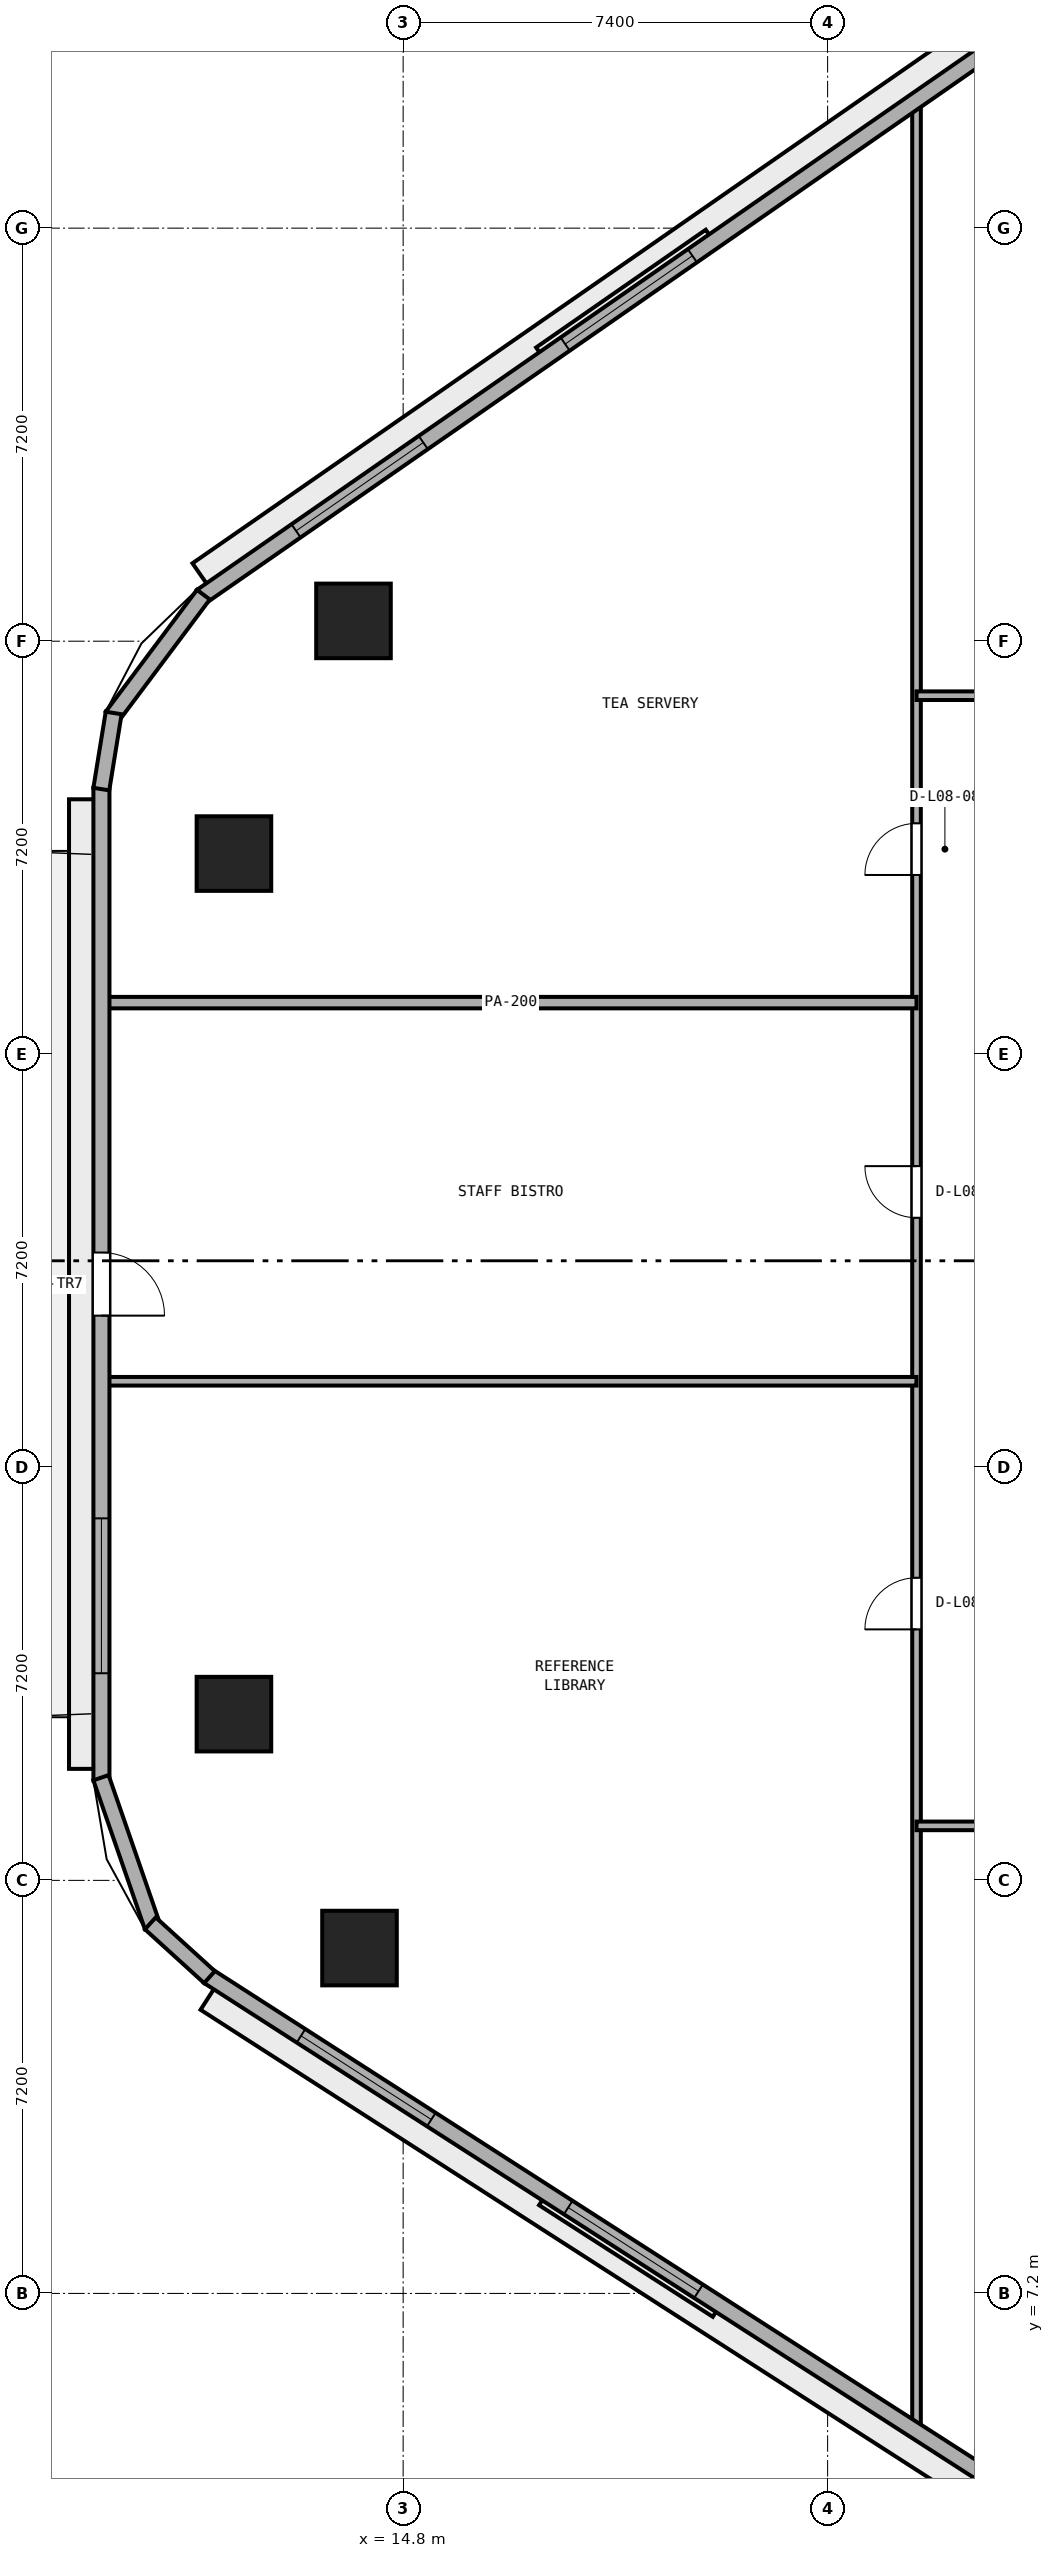
"""IFC4 building model, lengths in metres.
Left out: names, types, materials, properties, quantities, classifications, styles, units other than length and angle.
Written with IfcOpenShell. Run it as: python <this file> out.ifc"""

import sys

from ifc_helpers import new_model, si_unit, direction, frame, frame_2d, origin, origin_2d, place, context, subcontext, project, spatial, rectangle, extrude, element, fill, save


model = new_model("IFC4")
c1 = context("Model", 3, precision=1e-05, world=origin(), true_north=direction((0.0, 1.0)))
c2 = subcontext(c1, "Body", "Model", "MODEL_VIEW")
j1 = project(units=[si_unit("LENGTHUNIT", "METRE"), si_unit("PLANEANGLEUNIT", "RADIAN")], contexts=[c1])
p1 = place(None, origin())
s1 = spatial("IfcSite", under=j1, at=p1, CompositionType="ELEMENT")
p2 = place(p1, origin())
s2 = spatial("IfcBuilding", under=s1, at=p2, CompositionType="ELEMENT")
p3 = place(p2, frame((0.0, 0.0, 36.4)))
s3 = spatial("IfcBuildingStorey", under=s2, at=p3, CompositionType="ELEMENT", Elevation=36.4)
for number, where, z_axis, x_axis in (
    (1, (13.934, 36.354, 0.0), (0.0, 0.0, 1.0), (1.0, 0.0, 0.0)),
    (2, (11.85, 32.298, 0.0), (0.0, 0.0, 1.0), (1.0, 0.0, 0.0)),
    (3, (11.85, 17.298, 0.0), (0.0, 0.0, 1.0), (1.0, 0.0, 0.0)),
    (4, (14.039, 13.22, 0.0), (0.0, 0.0, 1.0), (1.0, 0.0, 0.0)),
):
    element("IfcColumn", number, at=place(p3, frame(where, z_axis=z_axis, x_axis=x_axis)), inside=s3, PredefinedType="COLUMN", context=c2, shape_type="SweptSolid", body=[
        extrude(rectangle(XDim=1.3, YDim=1.3, at=origin_2d()), origin(), (0.0, 0.0, 1.0), 3.8),
    ])
p4 = place(p3, frame((23.75, 4.769, 0.0), z_axis=(0.0, 0.0, 1.0), x_axis=(0.0, 1.0, 0.0)))
e5 = element("IfcWall", 5, at=p4, inside=s3, PredefinedType="PARTITIONING", context=c2, shape_type="SweptSolid", body=[
    extrude(rectangle(XDim=40.691, YDim=0.15, at=frame_2d((20.345, 0.0))), origin(), (0.0, 0.0, 1.0), 3.525),
])
p5 = place(p4, frame((14.006, 0.0, 0.0)))
e6 = element("IfcOpeningElement", 6, at=p5, cuts=e5, PredefinedType="OPENING", context=c2, shape_type="SweptSolid", body=[
    extrude(rectangle(XDim=0.9, YDim=2.1, at=frame_2d((0.45, 1.05))), frame((0.0, 0.085, 0.0), z_axis=(0.0, -1.0, 0.0), x_axis=(1.0, 0.0, 0.0)), (0.0, 0.0, 1.0), 0.17),
])
p6 = place(p4, frame((21.181, 0.0, 0.0)))
e7 = element("IfcOpeningElement", 7, at=p6, cuts=e5, PredefinedType="OPENING", context=c2, shape_type="SweptSolid", body=[
    extrude(rectangle(XDim=0.9, YDim=2.1, at=frame_2d((0.45, 1.05))), frame((0.0, 0.085, 0.0), z_axis=(0.0, -1.0, 0.0), x_axis=(1.0, 0.0, 0.0)), (0.0, 0.0, 1.0), 0.17),
])
p7 = place(p4, frame((27.156, 0.0, 0.0)))
e8 = element("IfcOpeningElement", 8, at=p7, cuts=e5, PredefinedType="OPENING", context=c2, shape_type="SweptSolid", body=[
    extrude(rectangle(XDim=0.9, YDim=2.1, at=frame_2d((0.45, 1.05))), frame((0.0, 0.085, 0.0), z_axis=(0.0, -1.0, 0.0), x_axis=(1.0, 0.0, 0.0)), (0.0, 0.0, 1.0), 0.17),
])
p8 = place(p3, frame((23.75, 15.35, 0.0), z_axis=(0.0, 0.0, 1.0), x_axis=(1.0, 0.0, 0.0)))
e9 = element("IfcWall", 9, at=p8, inside=s3, PredefinedType="PARTITIONING", context=c2, shape_type="SweptSolid", body=[
    extrude(rectangle(XDim=26.5, YDim=0.15, at=frame_2d((13.25, 0.0))), origin(), (0.0, 0.0, 1.0), 3.525),
])
p9 = place(p8, frame((4.445, 0.0, 0.0)))
e10 = element("IfcOpeningElement", 10, at=p9, cuts=e9, PredefinedType="OPENING", context=c2, shape_type="SweptSolid", body=[
    extrude(rectangle(XDim=0.9, YDim=2.1, at=frame_2d((0.45, 1.05))), frame((0.0, 0.085, 0.0), z_axis=(0.0, -1.0, 0.0), x_axis=(1.0, 0.0, 0.0)), (0.0, 0.0, 1.0), 0.17),
])
p10 = place(p8, frame((17.455, 0.0, 0.0)))
e11 = element("IfcOpeningElement", 11, at=p10, cuts=e9, PredefinedType="OPENING", context=c2, shape_type="SweptSolid", body=[
    extrude(rectangle(XDim=0.9, YDim=2.1, at=frame_2d((0.45, 1.05))), frame((0.0, 0.085, 0.0), z_axis=(0.0, -1.0, 0.0), x_axis=(1.0, 0.0, 0.0)), (0.0, 0.0, 1.0), 0.17),
])
p11 = place(p3, frame((9.605, 23.1, 0.0), z_axis=(0.0, 0.0, 1.0), x_axis=(1.0, 0.0, 0.0)))
e12 = element("IfcWall", 12, at=p11, inside=s3, PredefinedType="PARTITIONING", context=c2, shape_type="SweptSolid", body=[
    extrude(rectangle(XDim=14.144, YDim=0.15, at=frame_2d((7.072, 0.0))), origin(), (0.0, 0.0, 1.0), 3.525),
])
p12 = place(p3, frame((9.605, 29.7, 0.0), z_axis=(0.0, 0.0, 1.0), x_axis=(1.0, 0.0, 0.0)))
e13 = element("IfcWall", 13, at=p12, inside=s3, PredefinedType="PARTITIONING", context=c2, shape_type="SweptSolid", body=[
    extrude(rectangle(XDim=14.145, YDim=0.2, at=frame_2d((7.073, 0.0))), origin(), (0.0, 0.0, 1.0), 3.525),
])
p13 = place(p3, frame((23.75, 35.05, 0.0), z_axis=(0.0, 0.0, 1.0), x_axis=(1.0, 0.0, 0.0)))
e14 = element("IfcWall", 14, at=p13, inside=s3, PredefinedType="PARTITIONING", context=c2, shape_type="SweptSolid", body=[
    extrude(rectangle(XDim=26.5, YDim=0.15, at=frame_2d((13.25, 0.0))), origin(), (0.0, 0.0, 1.0), 3.525),
])
p14 = place(p13, frame((2.195, 0.0, 0.0)))
e15 = element("IfcOpeningElement", 15, at=p14, cuts=e14, PredefinedType="OPENING", context=c2, shape_type="SweptSolid", body=[
    extrude(rectangle(XDim=1.0, YDim=2.12, at=frame_2d((0.5, 1.06))), frame((0.0, 0.085, 0.0), z_axis=(0.0, -1.0, 0.0), x_axis=(1.0, 0.0, 0.0)), (0.0, 0.0, 1.0), 0.17),
])
p15 = place(p13, frame((10.4, 0.0, 0.0)))
e16 = element("IfcOpeningElement", 16, at=p15, cuts=e14, PredefinedType="OPENING", context=c2, shape_type="SweptSolid", body=[
    extrude(rectangle(XDim=1.0, YDim=2.12, at=frame_2d((0.5, 1.06))), frame((0.0, 0.085, 0.0), z_axis=(0.0, -1.0, 0.0), x_axis=(1.0, 0.0, 0.0)), (0.0, 0.0, 1.0), 0.17),
])
p16 = place(p13, frame((21.005, 0.0, 0.0)))
e17 = element("IfcOpeningElement", 17, at=p16, cuts=e14, PredefinedType="OPENING", context=c2, shape_type="SweptSolid", body=[
    extrude(rectangle(XDim=0.9, YDim=2.1, at=frame_2d((0.45, 1.05))), frame((0.0, 0.085, 0.0), z_axis=(0.0, -1.0, 0.0), x_axis=(1.0, 0.0, 0.0)), (0.0, 0.0, 1.0), 0.17),
])
p17 = place(p3, frame((26.182, 47.118, 0.0), z_axis=(0.0, 0.0, 1.0), x_axis=(-0.821547956627, -0.570139417127, 0.0)))
e18 = element("IfcWall", 18, at=p17, inside=s3, PredefinedType="STANDARD", context=c2, shape_type="SweptSolid", body=[
    extrude(rectangle(XDim=18.132, YDim=0.28, at=frame_2d((9.066, 0.0))), origin(), (0.0, 0.0, 1.0), 3.525),
])
p18 = place(p17, frame((7.716, 0.0, 0.9)))
e19 = element("IfcOpeningElement", 19, at=p18, cuts=e18, PredefinedType="OPENING", context=c2, shape_type="SweptSolid", body=[
    extrude(rectangle(XDim=2.7, YDim=1.75, at=frame_2d((1.35, 0.875))), frame((0.0, 0.15, 0.0), z_axis=(0.0, -1.0, 0.0), x_axis=(1.0, 0.0, 0.0)), (0.0, 0.0, 1.0), 0.3),
])
p19 = place(p17, frame((13.427, 0.0, 0.9)))
e20 = element("IfcOpeningElement", 20, at=p19, cuts=e18, PredefinedType="OPENING", context=c2, shape_type="SweptSolid", body=[
    extrude(rectangle(XDim=2.7, YDim=1.75, at=frame_2d((1.35, 0.875))), frame((0.0, 0.15, 0.0), z_axis=(0.0, -1.0, 0.0), x_axis=(1.0, 0.0, 0.0)), (0.0, 0.0, 1.0), 0.3),
])
p20 = place(p3, frame((9.54, 33.444, 0.0), z_axis=(0.0, 0.0, 1.0), x_axis=(0.0, -1.0, 0.0)))
e21 = element("IfcWall", 21, at=p20, inside=s3, PredefinedType="STANDARD", context=c2, shape_type="SweptSolid", body=[
    extrude(rectangle(XDim=17.301, YDim=0.28, at=frame_2d((8.65, 0.0))), origin(), (0.0, 0.0, 1.0), 3.525),
])
p21 = place(p20, frame((8.1, 0.0, 0.0)))
e22 = element("IfcOpeningElement", 22, at=p21, cuts=e21, PredefinedType="OPENING", context=c2, shape_type="SweptSolid", body=[
    extrude(rectangle(XDim=1.1, YDim=2.2, at=frame_2d((0.55, 1.1))), frame((0.0, 0.15, 0.0), z_axis=(0.0, -1.0, 0.0), x_axis=(1.0, 0.0, 0.0)), (0.0, 0.0, 1.0), 0.3),
])
p22 = place(p20, frame((12.734, 0.0, 0.9)))
e23 = element("IfcOpeningElement", 23, at=p22, cuts=e21, PredefinedType="OPENING", context=c2, shape_type="SweptSolid", body=[
    extrude(rectangle(XDim=2.7, YDim=1.75, at=frame_2d((1.35, 0.875))), frame((0.0, 0.15, 0.0), z_axis=(0.0, -1.0, 0.0), x_axis=(1.0, 0.0, 0.0)), (0.0, 0.0, 1.0), 0.3),
])
p23 = place(p3, frame((11.405, 12.728, 0.0), z_axis=(0.0, 0.0, 1.0), x_axis=(0.841304564637, -0.540561402175, 0.0)))
e24 = element("IfcWall", 24, at=p23, inside=s3, PredefinedType="STANDARD", context=c2, shape_type="SweptSolid", body=[
    extrude(rectangle(XDim=17.612, YDim=0.28, at=frame_2d((8.806, 0.0))), origin(), (0.0, 0.0, 1.0), 3.525),
])
p24 = place(p23, frame((1.919, 0.0, 0.9)))
e25 = element("IfcOpeningElement", 25, at=p24, cuts=e24, PredefinedType="OPENING", context=c2, shape_type="SweptSolid", body=[
    extrude(rectangle(XDim=2.7, YDim=1.75, at=frame_2d((1.35, 0.875))), frame((0.0, 0.15, 0.0), z_axis=(0.0, -1.0, 0.0), x_axis=(1.0, 0.0, 0.0)), (0.0, 0.0, 1.0), 0.3),
])
p25 = place(p23, frame((7.456, 0.0, 0.9)))
e26 = element("IfcOpeningElement", 26, at=p25, cuts=e24, PredefinedType="OPENING", context=c2, shape_type="SweptSolid", body=[
    extrude(rectangle(XDim=2.7, YDim=1.75, at=frame_2d((1.35, 0.875))), frame((0.0, 0.15, 0.0), z_axis=(0.0, -1.0, 0.0), x_axis=(1.0, 0.0, 0.0)), (0.0, 0.0, 1.0), 0.3),
])
p26 = place(p3, frame((11.318, 36.811, 0.0), z_axis=(0.0, 0.0, 1.0), x_axis=(-0.599455152629, -0.800408345775, 0.0)))
e27 = element("IfcWall", 27, at=p26, inside=s3, PredefinedType="STANDARD", context=c2, shape_type="SweptSolid", body=[
    extrude(rectangle(XDim=2.653, YDim=0.28, at=frame_2d((1.327, 0.0))), origin(), (0.0, 0.0, 1.0), 3.525),
])
p27 = place(p3, frame((9.753, 34.749, 0.0), z_axis=(0.0, 0.0, 1.0), x_axis=(-0.160037671962, -0.987110907423, 0.0)))
e28 = element("IfcWall", 28, at=p27, inside=s3, PredefinedType="STANDARD", context=c2, shape_type="SweptSolid", body=[
    extrude(rectangle(XDim=1.344, YDim=0.28, at=frame_2d((0.672, 0.0))), origin(), (0.0, 0.0, 1.0), 3.525),
])
p28 = place(p3, frame((9.532, 16.189, 0.0), z_axis=(0.0, 0.0, 1.0), x_axis=(0.32708309668, -0.944995580871, 0.0)))
e29 = element("IfcWall", 29, at=p28, inside=s3, PredefinedType="STANDARD", context=c2, shape_type="SweptSolid", body=[
    extrude(rectangle(XDim=2.748, YDim=0.28, at=frame_2d((1.374, 0.0))), origin(), (0.0, 0.0, 1.0), 3.525),
])
p29 = place(p3, frame((10.393, 13.651, 0.0), z_axis=(0.0, 0.0, 1.0), x_axis=(0.74003521851, -0.672568119498, 0.0)))
e30 = element("IfcWall", 30, at=p29, inside=s3, PredefinedType="STANDARD", context=c2, shape_type="SweptSolid", body=[
    extrude(rectangle(XDim=1.393, YDim=0.28, at=frame_2d((0.697, 0.0))), origin(), (0.0, 0.0, 1.0), 3.525),
])
p30 = place(p5, origin())
e31 = element("IfcDoor", 31, at=p30, inside=s3, OperationType="SINGLE_SWING_LEFT", PredefinedType="DOOR", context=c2, shape_type="SweptSolid", body=[
    extrude(rectangle(XDim=0.9, YDim=2.1, at=frame_2d((0.45, 1.05))), frame((0.0, 0.025, 0.0), z_axis=(0.0, -1.0, 0.0), x_axis=(1.0, 0.0, 0.0)), (0.0, 0.0, 1.0), 0.05),
])
fill(e6, e31)
p31 = place(p6, origin())
e32 = element("IfcDoor", 32, at=p31, inside=s3, OperationType="SINGLE_SWING_RIGHT", PredefinedType="DOOR", context=c2, shape_type="SweptSolid", body=[
    extrude(rectangle(XDim=0.9, YDim=2.1, at=frame_2d((0.45, 1.05))), frame((0.0, 0.025, 0.0), z_axis=(0.0, -1.0, 0.0), x_axis=(1.0, 0.0, 0.0)), (0.0, 0.0, 1.0), 0.05),
])
fill(e7, e32)
p32 = place(p7, origin())
e33 = element("IfcDoor", 33, at=p32, inside=s3, OperationType="SINGLE_SWING_LEFT", PredefinedType="DOOR", context=c2, shape_type="SweptSolid", body=[
    extrude(rectangle(XDim=0.9, YDim=2.1, at=frame_2d((0.45, 1.05))), frame((0.0, 0.025, 0.0), z_axis=(0.0, -1.0, 0.0), x_axis=(1.0, 0.0, 0.0)), (0.0, 0.0, 1.0), 0.05),
])
fill(e8, e33)
p33 = place(p18, origin())
e34 = element("IfcWindow", 34, at=p33, inside=s3, PartitioningType="SINGLE_PANEL", PredefinedType="WINDOW", context=c2, shape_type="SweptSolid", body=[
    extrude(rectangle(XDim=2.7, YDim=1.75, at=frame_2d((1.35, 0.875))), frame((0.0, 0.03, 0.0), z_axis=(0.0, -1.0, 0.0), x_axis=(1.0, 0.0, 0.0)), (0.0, 0.0, 1.0), 0.06),
])
fill(e19, e34)
p34 = place(p19, origin())
e35 = element("IfcWindow", 35, at=p34, inside=s3, PartitioningType="SINGLE_PANEL", PredefinedType="WINDOW", context=c2, shape_type="SweptSolid", body=[
    extrude(rectangle(XDim=2.7, YDim=1.75, at=frame_2d((1.35, 0.875))), frame((0.0, 0.03, 0.0), z_axis=(0.0, -1.0, 0.0), x_axis=(1.0, 0.0, 0.0)), (0.0, 0.0, 1.0), 0.06),
])
fill(e20, e35)
p35 = place(p21, origin())
e36 = element("IfcDoor", 36, at=p35, inside=s3, OperationType="SINGLE_SWING_RIGHT", PredefinedType="DOOR", context=c2, shape_type="SweptSolid", body=[
    extrude(rectangle(XDim=1.1, YDim=2.2, at=frame_2d((0.55, 1.1))), frame((0.0, 0.025, 0.0), z_axis=(0.0, -1.0, 0.0), x_axis=(1.0, 0.0, 0.0)), (0.0, 0.0, 1.0), 0.05),
])
fill(e22, e36)
p36 = place(p22, origin())
e37 = element("IfcWindow", 37, at=p36, inside=s3, PartitioningType="SINGLE_PANEL", PredefinedType="WINDOW", context=c2, shape_type="SweptSolid", body=[
    extrude(rectangle(XDim=2.7, YDim=1.75, at=frame_2d((1.35, 0.875))), frame((0.0, 0.03, 0.0), z_axis=(0.0, -1.0, 0.0), x_axis=(1.0, 0.0, 0.0)), (0.0, 0.0, 1.0), 0.06),
])
fill(e23, e37)
p37 = place(p24, origin())
e38 = element("IfcWindow", 38, at=p37, inside=s3, PartitioningType="SINGLE_PANEL", PredefinedType="WINDOW", context=c2, shape_type="SweptSolid", body=[
    extrude(rectangle(XDim=2.7, YDim=1.75, at=frame_2d((1.35, 0.875))), frame((0.0, 0.03, 0.0), z_axis=(0.0, -1.0, 0.0), x_axis=(1.0, 0.0, 0.0)), (0.0, 0.0, 1.0), 0.06),
])
fill(e25, e38)
p38 = place(p25, origin())
e39 = element("IfcWindow", 39, at=p38, inside=s3, PartitioningType="SINGLE_PANEL", PredefinedType="WINDOW", context=c2, shape_type="SweptSolid", body=[
    extrude(rectangle(XDim=2.7, YDim=1.75, at=frame_2d((1.35, 0.875))), frame((0.0, 0.03, 0.0), z_axis=(0.0, -1.0, 0.0), x_axis=(1.0, 0.0, 0.0)), (0.0, 0.0, 1.0), 0.06),
])
fill(e26, e39)
save(model, sys.argv[1])
